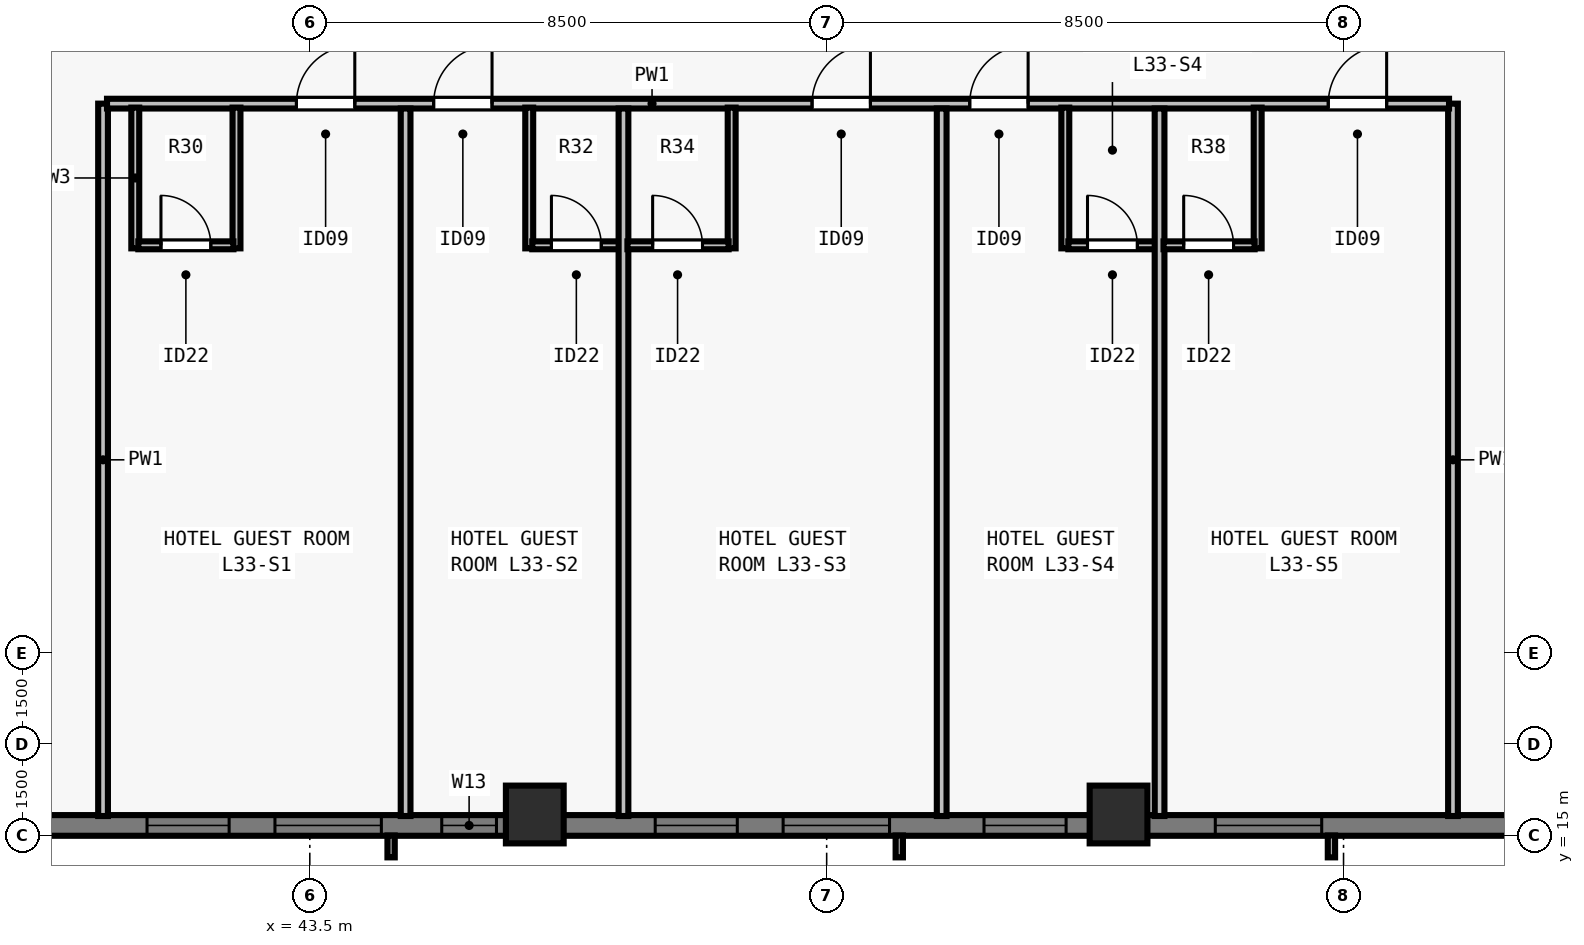
"""IFC4 building model, lengths in metres.
Left out: names, types, materials, properties, quantities, classifications, styles, units other than length and angle.
Written with IfcOpenShell. Run it as: python <this file> out.ifc"""

import sys

from ifc_helpers import new_model, si_unit, direction, frame, frame_2d, origin, origin_2d, place, context, subcontext, project, spatial, rectangle, extrude, element, fill, save


model = new_model("IFC4")
c1 = context("Model", 3, precision=1e-05, world=origin(), true_north=direction((0.0, 1.0)))
c2 = subcontext(c1, "Body", "Model", "MODEL_VIEW")
j1 = project(units=[si_unit("LENGTHUNIT", "METRE"), si_unit("PLANEANGLEUNIT", "RADIAN")], contexts=[c1])
p1 = place(None, origin())
s1 = spatial("IfcSite", under=j1, at=p1, CompositionType="ELEMENT")
p2 = place(p1, origin())
s2 = spatial("IfcBuilding", under=s1, at=p2, CompositionType="ELEMENT")
p3 = place(p2, frame((0.0, 0.0, 123.5)))
s3 = spatial("IfcBuildingStorey", under=s2, at=p3, CompositionType="ELEMENT", Elevation=123.5)
for number, where, z_axis, x_axis in (
    (1, (47.2, 15.35, 0.0), (0.0, 0.0, 1.0), (1.0, 0.0, 0.0)),
    (2, (56.8, 15.35, 0.0), (0.0, 0.0, 1.0), (1.0, 0.0, 0.0)),
):
    element("IfcColumn", number, at=place(p3, frame(where, z_axis=z_axis, x_axis=x_axis)), inside=s3, PredefinedType="COLUMN", context=c2, shape_type="SweptSolid", body=[
        extrude(rectangle(XDim=0.95, YDim=0.95, at=origin_2d()), origin(), (0.0, 0.0, 1.0), 3.5),
    ])
p4 = place(p3, frame((72.0, 15.17, 0.0), z_axis=(0.0, 0.0, 1.0), x_axis=(-1.0, 0.0, 0.0)))
e3 = element("IfcWall", 3, at=p4, inside=s3, PredefinedType="SOLIDWALL", context=c2, shape_type="SweptSolid", body=[
    extrude(rectangle(XDim=39.682, YDim=0.34, at=frame_2d((19.841, 0.0))), origin(), (0.0, 0.0, 1.0), 3.28),
])
p5 = place(p4, frame((11.859, 0.0, 0.8)))
e4 = element("IfcOpeningElement", 4, at=p5, cuts=e3, PredefinedType="OPENING", context=c2, shape_type="SweptSolid", body=[
    extrude(rectangle(XDim=1.75, YDim=1.66, at=frame_2d((0.875, 0.83))), frame((0.0, 0.18, 0.0), z_axis=(0.0, -1.0, 0.0), x_axis=(1.0, 0.0, 0.0)), (0.0, 0.0, 1.0), 0.36),
])
p6 = place(p4, frame((16.062, 0.0, 0.8)))
e5 = element("IfcOpeningElement", 5, at=p6, cuts=e3, PredefinedType="OPENING", context=c2, shape_type="SweptSolid", body=[
    extrude(rectangle(XDim=1.35, YDim=1.66, at=frame_2d((0.675, 0.83))), frame((0.0, 0.18, 0.0), z_axis=(0.0, -1.0, 0.0), x_axis=(1.0, 0.0, 0.0)), (0.0, 0.0, 1.0), 0.36),
])
p7 = place(p4, frame((18.966, 0.0, 0.8)))
e6 = element("IfcOpeningElement", 6, at=p7, cuts=e3, PredefinedType="OPENING", context=c2, shape_type="SweptSolid", body=[
    extrude(rectangle(XDim=1.75, YDim=1.66, at=frame_2d((0.875, 0.83))), frame((0.0, 0.18, 0.0), z_axis=(0.0, -1.0, 0.0), x_axis=(1.0, 0.0, 0.0)), (0.0, 0.0, 1.0), 0.36),
])
p8 = place(p4, frame((21.469, 0.0, 0.8)))
e7 = element("IfcOpeningElement", 7, at=p8, cuts=e3, PredefinedType="OPENING", context=c2, shape_type="SweptSolid", body=[
    extrude(rectangle(XDim=1.35, YDim=1.66, at=frame_2d((0.675, 0.83))), frame((0.0, 0.18, 0.0), z_axis=(0.0, -1.0, 0.0), x_axis=(1.0, 0.0, 0.0)), (0.0, 0.0, 1.0), 0.36),
])
p9 = place(p4, frame((27.323, 0.0, 0.8)))
e8 = element("IfcOpeningElement", 8, at=p9, cuts=e3, PredefinedType="OPENING", context=c2, shape_type="SweptSolid", body=[
    extrude(rectangle(XDim=1.75, YDim=1.66, at=frame_2d((0.875, 0.83))), frame((0.0, 0.18, 0.0), z_axis=(0.0, -1.0, 0.0), x_axis=(1.0, 0.0, 0.0)), (0.0, 0.0, 1.0), 0.36),
])
p10 = place(p4, frame((29.827, 0.0, 0.8)))
e9 = element("IfcOpeningElement", 9, at=p10, cuts=e3, PredefinedType="OPENING", context=c2, shape_type="SweptSolid", body=[
    extrude(rectangle(XDim=1.35, YDim=1.66, at=frame_2d((0.675, 0.83))), frame((0.0, 0.18, 0.0), z_axis=(0.0, -1.0, 0.0), x_axis=(1.0, 0.0, 0.0)), (0.0, 0.0, 1.0), 0.36),
])
p11 = place(p4, frame((25.43, 0.0, 0.8)))
e10 = element("IfcOpeningElement", 10, at=p11, cuts=e3, PredefinedType="OPENING", context=c2, shape_type="SweptSolid", body=[
    extrude(rectangle(XDim=0.9, YDim=1.66, at=frame_2d((0.45, 0.83))), frame((0.0, 0.18, 0.0), z_axis=(0.0, -1.0, 0.0), x_axis=(1.0, 0.0, 0.0)), (0.0, 0.0, 1.0), 0.36),
])
p12 = place(p4, frame((34.39, 0.0, 0.8)))
e11 = element("IfcOpeningElement", 11, at=p12, cuts=e3, PredefinedType="OPENING", context=c2, shape_type="SweptSolid", body=[
    extrude(rectangle(XDim=0.9, YDim=1.66, at=frame_2d((0.45, 0.83))), frame((0.0, 0.18, 0.0), z_axis=(0.0, -1.0, 0.0), x_axis=(1.0, 0.0, 0.0)), (0.0, 0.0, 1.0), 0.36),
])
p13 = place(p3, frame((40.1, 15.325, 0.0), z_axis=(0.0, 0.0, 1.0), x_axis=(0.0, 1.0, 0.0)))
e12 = element("IfcWall", 12, at=p13, inside=s3, PredefinedType="PARTITIONING", context=c2, shape_type="SweptSolid", body=[
    extrude(rectangle(XDim=11.715, YDim=0.16, at=frame_2d((5.857, 0.0))), origin(), (0.0, 0.0, 1.0), 2.555),
])
p14 = place(p3, frame((62.3, 15.325, 0.0), z_axis=(0.0, 0.0, 1.0), x_axis=(0.0, 1.0, 0.0)))
e13 = element("IfcWall", 13, at=p14, inside=s3, PredefinedType="PARTITIONING", context=c2, shape_type="SweptSolid", body=[
    extrude(rectangle(XDim=11.715, YDim=0.16, at=frame_2d((5.857, 0.0))), origin(), (0.0, 0.0, 1.0), 3.28),
])
p15 = place(p3, frame((40.165, 27.04, 0.0), z_axis=(0.0, 0.0, 1.0), x_axis=(1.0, 0.0, 0.0)))
e14 = element("IfcWall", 14, at=p15, inside=s3, PredefinedType="PARTITIONING", context=c2, shape_type="SweptSolid", body=[
    extrude(rectangle(XDim=22.07, YDim=0.16, at=frame_2d((11.035, 0.0))), origin(), (0.0, 0.0, 1.0), 3.28),
])
p16 = place(p15, frame((3.115, 0.0, 0.0)))
e15 = element("IfcOpeningElement", 15, at=p16, cuts=e14, PredefinedType="OPENING", context=c2, shape_type="SweptSolid", body=[
    extrude(rectangle(XDim=0.96, YDim=2.15, at=frame_2d((0.48, 1.075))), frame((0.0, 0.09, 0.0), z_axis=(0.0, -1.0, 0.0), x_axis=(1.0, 0.0, 0.0)), (0.0, 0.0, 1.0), 0.18),
])
p17 = place(p15, frame((5.372, 0.0, 0.0)))
e16 = element("IfcOpeningElement", 16, at=p17, cuts=e14, PredefinedType="OPENING", context=c2, shape_type="SweptSolid", body=[
    extrude(rectangle(XDim=0.96, YDim=2.15, at=frame_2d((0.48, 1.075))), frame((0.0, 0.09, 0.0), z_axis=(0.0, -1.0, 0.0), x_axis=(1.0, 0.0, 0.0)), (0.0, 0.0, 1.0), 0.18),
])
p18 = place(p15, frame((11.594, 0.0, 0.0)))
e17 = element("IfcOpeningElement", 17, at=p18, cuts=e14, PredefinedType="OPENING", context=c2, shape_type="SweptSolid", body=[
    extrude(rectangle(XDim=0.96, YDim=2.15, at=frame_2d((0.48, 1.075))), frame((0.0, 0.09, 0.0), z_axis=(0.0, -1.0, 0.0), x_axis=(1.0, 0.0, 0.0)), (0.0, 0.0, 1.0), 0.18),
])
p19 = place(p15, frame((14.188, 0.0, 0.0)))
e18 = element("IfcOpeningElement", 18, at=p19, cuts=e14, PredefinedType="OPENING", context=c2, shape_type="SweptSolid", body=[
    extrude(rectangle(XDim=0.96, YDim=2.15, at=frame_2d((0.48, 1.075))), frame((0.0, 0.09, 0.0), z_axis=(0.0, -1.0, 0.0), x_axis=(1.0, 0.0, 0.0)), (0.0, 0.0, 1.0), 0.18),
])
p20 = place(p15, frame((20.084, 0.0, 0.0)))
e19 = element("IfcOpeningElement", 19, at=p20, cuts=e14, PredefinedType="OPENING", context=c2, shape_type="SweptSolid", body=[
    extrude(rectangle(XDim=0.96, YDim=2.15, at=frame_2d((0.48, 1.075))), frame((0.0, 0.09, 0.0), z_axis=(0.0, -1.0, 0.0), x_axis=(1.0, 0.0, 0.0)), (0.0, 0.0, 1.0), 0.18),
])
p21 = place(p3, frame((40.63, 24.66, 0.0), z_axis=(0.0, 0.0, 1.0), x_axis=(0.0, 1.0, 0.0)))
e20 = element("IfcWall", 20, at=p21, inside=s3, PredefinedType="PLUMBINGWALL", context=c2, shape_type="SweptSolid", body=[
    extrude(rectangle(XDim=2.315, YDim=0.13, at=frame_2d((1.158, 0.0))), origin(), (0.0, 0.0, 1.0), 2.555),
])
p22 = place(p3, frame((42.294, 24.66, 0.0), z_axis=(0.0, 0.0, 1.0), x_axis=(0.0, 1.0, 0.0)))
e21 = element("IfcWall", 21, at=p22, inside=s3, PredefinedType="PLUMBINGWALL", context=c2, shape_type="SweptSolid", body=[
    extrude(rectangle(XDim=2.315, YDim=0.13, at=frame_2d((1.158, 0.0))), origin(), (0.0, 0.0, 1.0), 3.28),
])
p23 = place(p3, frame((40.68, 24.71, 0.0), z_axis=(0.0, 0.0, 1.0), x_axis=(1.0, 0.0, 0.0)))
e22 = element("IfcWall", 22, at=p23, inside=s3, PredefinedType="PLUMBINGWALL", context=c2, shape_type="SweptSolid", body=[
    extrude(rectangle(XDim=1.564, YDim=0.13, at=frame_2d((0.782, 0.0))), origin(), (0.0, 0.0, 1.0), 3.28),
])
p24 = place(p23, frame((0.372, 0.0, 0.0)))
e23 = element("IfcOpeningElement", 23, at=p24, cuts=e22, PredefinedType="OPENING", context=c2, shape_type="SweptSolid", body=[
    extrude(rectangle(XDim=0.82, YDim=2.1, at=frame_2d((0.41, 1.05))), frame((0.0, 0.075, 0.0), z_axis=(0.0, -1.0, 0.0), x_axis=(1.0, 0.0, 0.0)), (0.0, 0.0, 1.0), 0.15),
])
p25 = place(p3, frame((45.075, 15.325, 0.0), z_axis=(0.0, 0.0, 1.0), x_axis=(0.0, 1.0, 0.0)))
e24 = element("IfcWall", 24, at=p25, inside=s3, PredefinedType="PARTITIONING", context=c2, shape_type="SweptSolid", body=[
    extrude(rectangle(XDim=11.635, YDim=0.16, at=frame_2d((5.817, 0.0))), origin(), (0.0, 0.0, 1.0), 3.28),
])
p26 = place(p3, frame((47.108, 24.66, 0.0), z_axis=(0.0, 0.0, 1.0), x_axis=(0.0, 1.0, 0.0)))
e25 = element("IfcWall", 25, at=p26, inside=s3, PredefinedType="PLUMBINGWALL", context=c2, shape_type="SweptSolid", body=[
    extrude(rectangle(XDim=2.315, YDim=0.13, at=frame_2d((1.158, 0.0))), origin(), (0.0, 0.0, 1.0), 2.555),
])
p27 = place(p3, frame((47.158, 24.71, 0.0), z_axis=(0.0, 0.0, 1.0), x_axis=(1.0, 0.0, 0.0)))
e26 = element("IfcWall", 26, at=p27, inside=s3, PredefinedType="PLUMBINGWALL", context=c2, shape_type="SweptSolid", body=[
    extrude(rectangle(XDim=1.55, YDim=0.13, at=frame_2d((0.775, 0.0))), origin(), (0.0, 0.0, 1.0), 3.28),
])
p28 = place(p27, frame((0.315, 0.0, 0.0)))
e27 = element("IfcOpeningElement", 27, at=p28, cuts=e26, PredefinedType="OPENING", context=c2, shape_type="SweptSolid", body=[
    extrude(rectangle(XDim=0.82, YDim=2.1, at=frame_2d((0.41, 1.05))), frame((0.0, 0.075, 0.0), z_axis=(0.0, -1.0, 0.0), x_axis=(1.0, 0.0, 0.0)), (0.0, 0.0, 1.0), 0.15),
])
p29 = place(p3, frame((48.658, 15.325, 0.0), z_axis=(0.0, 0.0, 1.0), x_axis=(0.0, 1.0, 0.0)))
e28 = element("IfcWall", 28, at=p29, inside=s3, PredefinedType="PARTITIONING", context=c2, shape_type="SweptSolid", body=[
    extrude(rectangle(XDim=11.635, YDim=0.16, at=frame_2d((5.817, 0.0))), origin(), (0.0, 0.0, 1.0), 2.896),
])
p30 = place(p3, frame((50.438, 24.66, 0.0), z_axis=(0.0, 0.0, 1.0), x_axis=(0.0, 1.0, 0.0)))
e29 = element("IfcWall", 29, at=p30, inside=s3, PredefinedType="PLUMBINGWALL", context=c2, shape_type="SweptSolid", body=[
    extrude(rectangle(XDim=2.315, YDim=0.13, at=frame_2d((1.158, 0.0))), origin(), (0.0, 0.0, 1.0), 3.28),
])
p31 = place(p3, frame((48.723, 24.71, 0.0), z_axis=(0.0, 0.0, 1.0), x_axis=(1.0, 0.0, 0.0)))
e30 = element("IfcWall", 30, at=p31, inside=s3, PredefinedType="PLUMBINGWALL", context=c2, shape_type="SweptSolid", body=[
    extrude(rectangle(XDim=1.664, YDim=0.13, at=frame_2d((0.832, 0.0))), origin(), (0.0, 0.0, 1.0), 3.28),
])
p32 = place(p31, frame((0.415, 0.0, 0.0)))
e31 = element("IfcOpeningElement", 31, at=p32, cuts=e30, PredefinedType="OPENING", context=c2, shape_type="SweptSolid", body=[
    extrude(rectangle(XDim=0.82, YDim=2.1, at=frame_2d((0.41, 1.05))), frame((0.0, 0.075, 0.0), z_axis=(0.0, -1.0, 0.0), x_axis=(1.0, 0.0, 0.0)), (0.0, 0.0, 1.0), 0.15),
])
p33 = place(p3, frame((53.892, 15.325, 0.0), z_axis=(0.0, 0.0, 1.0), x_axis=(0.0, 1.0, 0.0)))
e32 = element("IfcWall", 32, at=p33, inside=s3, PredefinedType="PARTITIONING", context=c2, shape_type="SweptSolid", body=[
    extrude(rectangle(XDim=11.635, YDim=0.16, at=frame_2d((5.817, 0.0))), origin(), (0.0, 0.0, 1.0), 2.896),
])
p34 = place(p3, frame((55.925, 24.66, 0.0), z_axis=(0.0, 0.0, 1.0), x_axis=(0.0, 1.0, 0.0)))
e33 = element("IfcWall", 33, at=p34, inside=s3, PredefinedType="PLUMBINGWALL", context=c2, shape_type="SweptSolid", body=[
    extrude(rectangle(XDim=2.315, YDim=0.13, at=frame_2d((1.158, 0.0))), origin(), (0.0, 0.0, 1.0), 3.28),
])
p35 = place(p3, frame((55.975, 24.71, 0.0), z_axis=(0.0, 0.0, 1.0), x_axis=(1.0, 0.0, 0.0)))
e34 = element("IfcWall", 34, at=p35, inside=s3, PredefinedType="PLUMBINGWALL", context=c2, shape_type="SweptSolid", body=[
    extrude(rectangle(XDim=1.55, YDim=0.13, at=frame_2d((0.775, 0.0))), origin(), (0.0, 0.0, 1.0), 3.28),
])
p36 = place(p35, frame((0.315, 0.0, 0.0)))
e35 = element("IfcOpeningElement", 35, at=p36, cuts=e34, PredefinedType="OPENING", context=c2, shape_type="SweptSolid", body=[
    extrude(rectangle(XDim=0.82, YDim=2.1, at=frame_2d((0.41, 1.05))), frame((0.0, 0.075, 0.0), z_axis=(0.0, -1.0, 0.0), x_axis=(1.0, 0.0, 0.0)), (0.0, 0.0, 1.0), 0.15),
])
p37 = place(p3, frame((57.475, 15.325, 0.0), z_axis=(0.0, 0.0, 1.0), x_axis=(0.0, 1.0, 0.0)))
e36 = element("IfcWall", 36, at=p37, inside=s3, PredefinedType="PARTITIONING", context=c2, shape_type="SweptSolid", body=[
    extrude(rectangle(XDim=11.635, YDim=0.16, at=frame_2d((5.817, 0.0))), origin(), (0.0, 0.0, 1.0), 3.28),
])
p38 = place(p3, frame((59.088, 24.66, 0.0), z_axis=(0.0, 0.0, 1.0), x_axis=(0.0, 1.0, 0.0)))
e37 = element("IfcWall", 37, at=p38, inside=s3, PredefinedType="PLUMBINGWALL", context=c2, shape_type="SweptSolid", body=[
    extrude(rectangle(XDim=2.315, YDim=0.13, at=frame_2d((1.158, 0.0))), origin(), (0.0, 0.0, 1.0), 3.28),
])
p39 = place(p3, frame((57.54, 24.71, 0.0), z_axis=(0.0, 0.0, 1.0), x_axis=(1.0, 0.0, 0.0)))
e38 = element("IfcWall", 38, at=p39, inside=s3, PredefinedType="PLUMBINGWALL", context=c2, shape_type="SweptSolid", body=[
    extrude(rectangle(XDim=1.499, YDim=0.13, at=frame_2d((0.749, 0.0))), origin(), (0.0, 0.0, 1.0), 3.28),
])
p40 = place(p39, frame((0.332, 0.0, 0.0)))
e39 = element("IfcOpeningElement", 39, at=p40, cuts=e38, PredefinedType="OPENING", context=c2, shape_type="SweptSolid", body=[
    extrude(rectangle(XDim=0.82, YDim=2.1, at=frame_2d((0.41, 1.05))), frame((0.0, 0.075, 0.0), z_axis=(0.0, -1.0, 0.0), x_axis=(1.0, 0.0, 0.0)), (0.0, 0.0, 1.0), 0.15),
])
p41 = place(p5, origin())
e40 = element("IfcWindow", 40, at=p41, inside=s3, PartitioningType="SINGLE_PANEL", PredefinedType="WINDOW", context=c2, shape_type="SweptSolid", body=[
    extrude(rectangle(XDim=1.75, YDim=1.66, at=frame_2d((0.875, 0.83))), frame((0.0, -0.05, 0.0), z_axis=(0.0, -1.0, 0.0), x_axis=(1.0, 0.0, 0.0)), (0.0, 0.0, 1.0), 0.06),
])
fill(e4, e40)
p42 = place(p6, origin())
e41 = element("IfcWindow", 41, at=p42, inside=s3, PartitioningType="SINGLE_PANEL", PredefinedType="WINDOW", context=c2, shape_type="SweptSolid", body=[
    extrude(rectangle(XDim=1.35, YDim=1.66, at=frame_2d((0.675, 0.83))), frame((0.0, -0.05, 0.0), z_axis=(0.0, -1.0, 0.0), x_axis=(1.0, 0.0, 0.0)), (0.0, 0.0, 1.0), 0.06),
])
fill(e5, e41)
p43 = place(p7, origin())
e42 = element("IfcWindow", 42, at=p43, inside=s3, PartitioningType="SINGLE_PANEL", PredefinedType="WINDOW", context=c2, shape_type="SweptSolid", body=[
    extrude(rectangle(XDim=1.75, YDim=1.66, at=frame_2d((0.875, 0.83))), frame((0.0, -0.05, 0.0), z_axis=(0.0, -1.0, 0.0), x_axis=(1.0, 0.0, 0.0)), (0.0, 0.0, 1.0), 0.06),
])
fill(e6, e42)
p44 = place(p8, origin())
e43 = element("IfcWindow", 43, at=p44, inside=s3, PartitioningType="SINGLE_PANEL", PredefinedType="WINDOW", context=c2, shape_type="SweptSolid", body=[
    extrude(rectangle(XDim=1.35, YDim=1.66, at=frame_2d((0.675, 0.83))), frame((0.0, -0.05, 0.0), z_axis=(0.0, -1.0, 0.0), x_axis=(1.0, 0.0, 0.0)), (0.0, 0.0, 1.0), 0.06),
])
fill(e7, e43)
p45 = place(p9, origin())
e44 = element("IfcWindow", 44, at=p45, inside=s3, PartitioningType="SINGLE_PANEL", PredefinedType="WINDOW", context=c2, shape_type="SweptSolid", body=[
    extrude(rectangle(XDim=1.75, YDim=1.66, at=frame_2d((0.875, 0.83))), frame((0.0, -0.05, 0.0), z_axis=(0.0, -1.0, 0.0), x_axis=(1.0, 0.0, 0.0)), (0.0, 0.0, 1.0), 0.06),
])
fill(e8, e44)
p46 = place(p10, origin())
e45 = element("IfcWindow", 45, at=p46, inside=s3, PartitioningType="SINGLE_PANEL", PredefinedType="WINDOW", context=c2, shape_type="SweptSolid", body=[
    extrude(rectangle(XDim=1.35, YDim=1.66, at=frame_2d((0.675, 0.83))), frame((0.0, -0.05, 0.0), z_axis=(0.0, -1.0, 0.0), x_axis=(1.0, 0.0, 0.0)), (0.0, 0.0, 1.0), 0.06),
])
fill(e9, e45)
p47 = place(p11, origin())
e46 = element("IfcWindow", 46, at=p47, inside=s3, PartitioningType="SINGLE_PANEL", PredefinedType="WINDOW", context=c2, shape_type="SweptSolid", body=[
    extrude(rectangle(XDim=0.9, YDim=1.66, at=frame_2d((0.45, 0.83))), frame((0.0, -0.04, 0.0), z_axis=(0.0, -1.0, 0.0), x_axis=(1.0, 0.0, 0.0)), (0.0, 0.0, 1.0), 0.06),
])
fill(e10, e46)
p48 = place(p24, origin())
e47 = element("IfcDoor", 47, at=p48, inside=s3, OperationType="SINGLE_SWING_LEFT", PredefinedType="DOOR", context=c2, shape_type="SweptSolid", body=[
    extrude(rectangle(XDim=0.82, YDim=2.1, at=frame_2d((0.41, 1.05))), frame((0.0, 0.025, 0.0), z_axis=(0.0, -1.0, 0.0), x_axis=(1.0, 0.0, 0.0)), (0.0, 0.0, 1.0), 0.05),
])
fill(e23, e47)
p49 = place(p16, origin())
e48 = element("IfcDoor", 48, at=p49, inside=s3, OperationType="SINGLE_SWING_RIGHT", PredefinedType="DOOR", context=c2, shape_type="SweptSolid", body=[
    extrude(rectangle(XDim=0.96, YDim=2.15, at=frame_2d((0.48, 1.075))), frame((0.0, 0.025, 0.0), z_axis=(0.0, -1.0, 0.0), x_axis=(1.0, 0.0, 0.0)), (0.0, 0.0, 1.0), 0.05),
])
fill(e15, e48)
p50 = place(p28, origin())
e49 = element("IfcDoor", 49, at=p50, inside=s3, OperationType="SINGLE_SWING_LEFT", PredefinedType="DOOR", context=c2, shape_type="SweptSolid", body=[
    extrude(rectangle(XDim=0.82, YDim=2.1, at=frame_2d((0.41, 1.05))), frame((0.0, 0.025, 0.0), z_axis=(0.0, -1.0, 0.0), x_axis=(1.0, 0.0, 0.0)), (0.0, 0.0, 1.0), 0.05),
])
fill(e27, e49)
p51 = place(p17, origin())
e50 = element("IfcDoor", 50, at=p51, inside=s3, OperationType="SINGLE_SWING_RIGHT", PredefinedType="DOOR", context=c2, shape_type="SweptSolid", body=[
    extrude(rectangle(XDim=0.96, YDim=2.15, at=frame_2d((0.48, 1.075))), frame((0.0, 0.025, 0.0), z_axis=(0.0, -1.0, 0.0), x_axis=(1.0, 0.0, 0.0)), (0.0, 0.0, 1.0), 0.05),
])
fill(e16, e50)
p52 = place(p32, origin())
e51 = element("IfcDoor", 51, at=p52, inside=s3, OperationType="SINGLE_SWING_LEFT", PredefinedType="DOOR", context=c2, shape_type="SweptSolid", body=[
    extrude(rectangle(XDim=0.82, YDim=2.1, at=frame_2d((0.41, 1.05))), frame((0.0, 0.025, 0.0), z_axis=(0.0, -1.0, 0.0), x_axis=(1.0, 0.0, 0.0)), (0.0, 0.0, 1.0), 0.05),
])
fill(e31, e51)
p53 = place(p18, origin())
e52 = element("IfcDoor", 52, at=p53, inside=s3, OperationType="SINGLE_SWING_RIGHT", PredefinedType="DOOR", context=c2, shape_type="SweptSolid", body=[
    extrude(rectangle(XDim=0.96, YDim=2.15, at=frame_2d((0.48, 1.075))), frame((0.0, 0.025, 0.0), z_axis=(0.0, -1.0, 0.0), x_axis=(1.0, 0.0, 0.0)), (0.0, 0.0, 1.0), 0.05),
])
fill(e17, e52)
p54 = place(p36, origin())
e53 = element("IfcDoor", 53, at=p54, inside=s3, OperationType="SINGLE_SWING_LEFT", PredefinedType="DOOR", context=c2, shape_type="SweptSolid", body=[
    extrude(rectangle(XDim=0.82, YDim=2.1, at=frame_2d((0.41, 1.05))), frame((0.0, 0.025, 0.0), z_axis=(0.0, -1.0, 0.0), x_axis=(1.0, 0.0, 0.0)), (0.0, 0.0, 1.0), 0.05),
])
fill(e35, e53)
p55 = place(p19, origin())
e54 = element("IfcDoor", 54, at=p55, inside=s3, OperationType="SINGLE_SWING_RIGHT", PredefinedType="DOOR", context=c2, shape_type="SweptSolid", body=[
    extrude(rectangle(XDim=0.96, YDim=2.15, at=frame_2d((0.48, 1.075))), frame((0.0, 0.025, 0.0), z_axis=(0.0, -1.0, 0.0), x_axis=(1.0, 0.0, 0.0)), (0.0, 0.0, 1.0), 0.05),
])
fill(e18, e54)
p56 = place(p40, origin())
e55 = element("IfcDoor", 55, at=p56, inside=s3, OperationType="SINGLE_SWING_LEFT", PredefinedType="DOOR", context=c2, shape_type="SweptSolid", body=[
    extrude(rectangle(XDim=0.82, YDim=2.1, at=frame_2d((0.41, 1.05))), frame((0.0, 0.025, 0.0), z_axis=(0.0, -1.0, 0.0), x_axis=(1.0, 0.0, 0.0)), (0.0, 0.0, 1.0), 0.05),
])
fill(e39, e55)
p57 = place(p20, origin())
e56 = element("IfcDoor", 56, at=p57, inside=s3, OperationType="SINGLE_SWING_RIGHT", PredefinedType="DOOR", context=c2, shape_type="SweptSolid", body=[
    extrude(rectangle(XDim=0.96, YDim=2.15, at=frame_2d((0.48, 1.075))), frame((0.0, 0.025, 0.0), z_axis=(0.0, -1.0, 0.0), x_axis=(1.0, 0.0, 0.0)), (0.0, 0.0, 1.0), 0.05),
])
fill(e19, e56)
save(model, sys.argv[1])
